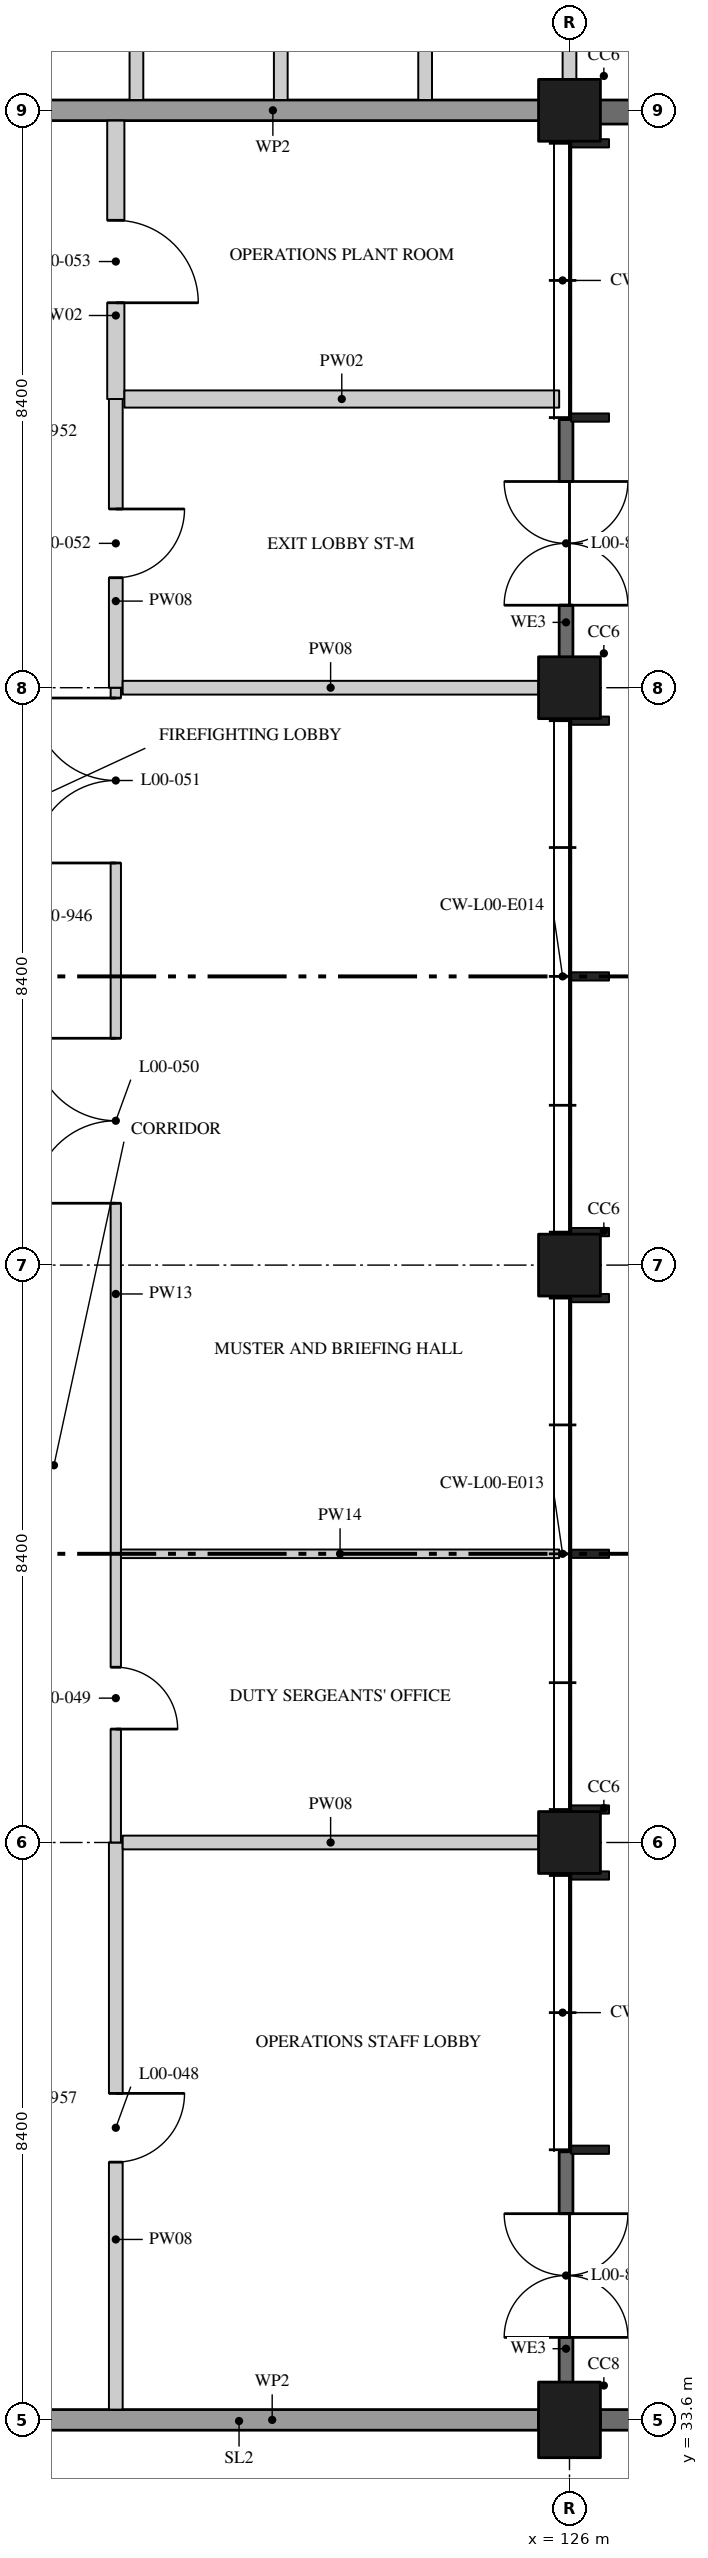
"""IFC4 building model, lengths in metres.
Left out: names, types, materials, properties, quantities, classifications, styles, units other than length and angle.
Written with IfcOpenShell. Run it as: python <this file> out.ifc"""

import sys

from ifc_helpers import new_model, si_unit, direction, frame, frame_2d, origin, origin_2d, place, context, subcontext, project, spatial, rectangle, extrude, element, fill, save


model = new_model("IFC4")
c1 = context("Model", 3, precision=1e-05, world=origin(), true_north=direction((0.0, 1.0)))
c2 = subcontext(c1, "Body", "Model", "MODEL_VIEW")
j1 = project(units=[si_unit("LENGTHUNIT", "METRE"), si_unit("PLANEANGLEUNIT", "RADIAN")], contexts=[c1])
p1 = place(None, origin())
s1 = spatial("IfcSite", under=j1, at=p1, CompositionType="ELEMENT")
p2 = place(p1, origin())
s2 = spatial("IfcBuilding", under=s1, at=p2, CompositionType="ELEMENT")
p3 = place(p2, origin())
s3 = spatial("IfcBuildingStorey", under=s2, at=p3, CompositionType="ELEMENT", Elevation=0.0)
p4 = place(p3, frame((126.0, 33.6, 0.0), z_axis=(0.0, 0.0, 1.0), x_axis=(1.0, 0.0, 0.0)))
e1 = element("IfcColumn", 1, at=p4, inside=s3, PredefinedType="COLUMN", context=c2, shape_type="SweptSolid", body=[
    extrude(rectangle(XDim=0.9, YDim=1.1, at=origin_2d()), origin(), (0.0, 0.0, 1.0), 5.05),
])
for number, where, z_axis, x_axis in (
    (2, (126.0, 42.0, 0.0), (0.0, 0.0, 1.0), (1.0, 0.0, 0.0)),
    (3, (126.0, 50.4, 0.0), (0.0, 0.0, 1.0), (1.0, 0.0, 0.0)),
    (4, (126.0, 58.8, 0.0), (0.0, 0.0, 1.0), (1.0, 0.0, 0.0)),
    (5, (126.0, 67.2, 0.0), (0.0, 0.0, 1.0), (1.0, 0.0, 0.0)),
):
    element("IfcColumn", number, at=place(p3, frame(where, z_axis=z_axis, x_axis=x_axis)), inside=s3, PredefinedType="COLUMN", context=c2, shape_type="SweptSolid", body=[
        extrude(rectangle(XDim=0.9, YDim=0.9, at=origin_2d()), origin(), (0.0, 0.0, 1.0), 5.05),
    ])
p5 = place(p3, frame((119.4, 33.75, 0.0), z_axis=(0.0, 0.0, 1.0), x_axis=(0.0, 1.0, 0.0)))
e6 = element("IfcWall", 6, at=p5, inside=s3, PredefinedType="PARTITIONING", context=c2, shape_type="SweptSolid", body=[
    extrude(rectangle(XDim=8.25, YDim=0.2, at=frame_2d((4.125, 0.0))), origin(), (0.0, 0.0, 1.0), 5.05),
])
p6 = place(p5, frame((3.6, 0.0, 0.0)))
e7 = element("IfcOpeningElement", 7, at=p6, cuts=e6, PredefinedType="OPENING", context=c2, shape_type="SweptSolid", body=[
    extrude(rectangle(XDim=1.0, YDim=2.4, at=frame_2d((0.5, 1.2))), frame((0.0, 0.11, 0.0), z_axis=(0.0, -1.0, 0.0), x_axis=(1.0, 0.0, 0.0)), (0.0, 0.0, 1.0), 0.22),
])
p7 = place(p3, frame((119.4, 42.0, 0.0), z_axis=(0.0, 0.0, 1.0), x_axis=(0.0, 1.0, 0.0)))
e8 = element("IfcWall", 8, at=p7, inside=s3, PredefinedType="PARTITIONING", context=c2, shape_type="SweptSolid", body=[
    extrude(rectangle(XDim=4.2, YDim=0.15, at=frame_2d((2.1, 0.0))), origin(), (0.0, 0.0, 1.0), 5.05),
])
p8 = place(p7, frame((1.65, 0.0, 0.0)))
e9 = element("IfcOpeningElement", 9, at=p8, cuts=e8, PredefinedType="OPENING", context=c2, shape_type="SweptSolid", body=[
    extrude(rectangle(XDim=0.9, YDim=2.1, at=frame_2d((0.45, 1.05))), frame((0.0, 0.085, 0.0), z_axis=(0.0, -1.0, 0.0), x_axis=(1.0, 0.0, 0.0)), (0.0, 0.0, 1.0), 0.17),
])
p9 = place(p3, frame((119.4, 46.2, 0.0), z_axis=(0.0, 0.0, 1.0), x_axis=(0.0, 1.0, 0.0)))
e10 = element("IfcWall", 10, at=p9, inside=s3, PredefinedType="PARTITIONING", context=c2, shape_type="SweptSolid", body=[
    extrude(rectangle(XDim=12.6, YDim=0.15, at=frame_2d((6.3, 0.0))), origin(), (0.0, 0.0, 1.0), 5.05),
])
p10 = place(p9, frame((5.1, 0.0, 0.0)))
e11 = element("IfcOpeningElement", 11, at=p10, cuts=e10, PredefinedType="OPENING", context=c2, shape_type="SweptSolid", body=[
    extrude(rectangle(XDim=2.4, YDim=2.7, at=frame_2d((1.2, 1.35))), frame((0.0, 0.085, 0.0), z_axis=(0.0, -1.0, 0.0), x_axis=(1.0, 0.0, 0.0)), (0.0, 0.0, 1.0), 0.17),
])
p11 = place(p9, frame((10.05, 0.0, 0.0)))
e12 = element("IfcOpeningElement", 12, at=p11, cuts=e10, PredefinedType="OPENING", context=c2, shape_type="SweptSolid", body=[
    extrude(rectangle(XDim=2.4, YDim=2.7, at=frame_2d((1.2, 1.35))), frame((0.0, 0.085, 0.0), z_axis=(0.0, -1.0, 0.0), x_axis=(1.0, 0.0, 0.0)), (0.0, 0.0, 1.0), 0.17),
])
p12 = place(p3, frame((119.4, 58.8, 0.0), z_axis=(0.0, 0.0, 1.0), x_axis=(0.0, 1.0, 0.0)))
e13 = element("IfcWall", 13, at=p12, inside=s3, PredefinedType="PARTITIONING", context=c2, shape_type="SweptSolid", body=[
    extrude(rectangle(XDim=4.2, YDim=0.2, at=frame_2d((2.1, 0.0))), origin(), (0.0, 0.0, 1.0), 5.05),
])
p13 = place(p12, frame((1.6, 0.0, 0.0)))
e14 = element("IfcOpeningElement", 14, at=p13, cuts=e13, PredefinedType="OPENING", context=c2, shape_type="SweptSolid", body=[
    extrude(rectangle(XDim=1.0, YDim=2.4, at=frame_2d((0.5, 1.2))), frame((0.0, 0.11, 0.0), z_axis=(0.0, -1.0, 0.0), x_axis=(1.0, 0.0, 0.0)), (0.0, 0.0, 1.0), 0.22),
])
p14 = place(p3, frame((119.4, 63.0, 0.0), z_axis=(0.0, 0.0, 1.0), x_axis=(0.0, 1.0, 0.0)))
e15 = element("IfcWall", 15, at=p14, inside=s3, PredefinedType="PARTITIONING", context=c2, shape_type="SweptSolid", body=[
    extrude(rectangle(XDim=4.05, YDim=0.25, at=frame_2d((2.025, 0.0))), origin(), (0.0, 0.0, 1.0), 5.05),
])
p15 = place(p14, frame((1.4, 0.0, 0.0)))
e16 = element("IfcOpeningElement", 16, at=p15, cuts=e15, PredefinedType="OPENING", context=c2, shape_type="SweptSolid", body=[
    extrude(rectangle(XDim=1.2, YDim=2.4, at=frame_2d((0.6, 1.2))), frame((0.0, 0.135, 0.0), z_axis=(0.0, -1.0, 0.0), x_axis=(1.0, 0.0, 0.0)), (0.0, 0.0, 1.0), 0.27),
])
p16 = place(p3, frame((119.5, 42.0, 0.0), z_axis=(0.0, 0.0, 1.0), x_axis=(1.0, 0.0, 0.0)))
e17 = element("IfcWall", 17, at=p16, inside=s3, PredefinedType="PARTITIONING", context=c2, shape_type="SweptSolid", body=[
    extrude(rectangle(XDim=6.05, YDim=0.2, at=frame_2d((3.025, 0.0))), origin(), (0.0, 0.0, 1.0), 5.05),
])
p17 = place(p3, frame((119.475, 46.2, 0.0), z_axis=(0.0, 0.0, 1.0), x_axis=(1.0, 0.0, 0.0)))
e18 = element("IfcWall", 18, at=p17, inside=s3, PredefinedType="PARTITIONING", context=c2, shape_type="SweptSolid", body=[
    extrude(rectangle(XDim=6.375, YDim=0.125, at=frame_2d((3.188, 0.0))), origin(), (0.0, 0.0, 1.0), 5.05),
])
p18 = place(p3, frame((119.5, 58.8, 0.0), z_axis=(0.0, 0.0, 1.0), x_axis=(1.0, 0.0, 0.0)))
e19 = element("IfcWall", 19, at=p18, inside=s3, PredefinedType="PARTITIONING", context=c2, shape_type="SweptSolid", body=[
    extrude(rectangle(XDim=6.05, YDim=0.2, at=frame_2d((3.025, 0.0))), origin(), (0.0, 0.0, 1.0), 5.05),
])
p19 = place(p3, frame((119.525, 63.0, 0.0), z_axis=(0.0, 0.0, 1.0), x_axis=(1.0, 0.0, 0.0)))
e20 = element("IfcWall", 20, at=p19, inside=s3, PredefinedType="PARTITIONING", context=c2, shape_type="SweptSolid", body=[
    extrude(rectangle(XDim=6.325, YDim=0.25, at=frame_2d((3.163, 0.0))), origin(), (0.0, 0.0, 1.0), 5.05),
])
for number, where, z_axis, x_axis in (
    (21, (123.9, 67.35, 0.0), (0.0, 0.0, 1.0), (0.0, 1.0, 0.0)),
    (22, (121.8, 67.35, 0.0), (0.0, 0.0, 1.0), (0.0, 1.0, 0.0)),
):
    element("IfcWall", number, at=place(p3, frame(where, z_axis=z_axis, x_axis=x_axis)), inside=s3, PredefinedType="PARTITIONING", context=c2, shape_type="SweptSolid", body=[
        extrude(rectangle(XDim=3.05, YDim=0.2, at=frame_2d((1.525, 0.0))), origin(), (0.0, 0.0, 1.0), 5.05),
    ])
p20 = place(p3, frame((126.0, 67.65, 0.0), z_axis=(0.0, 0.0, 1.0), x_axis=(0.0, 1.0, 0.0)))
e23 = element("IfcWall", 23, at=p20, inside=s3, PredefinedType="PARTITIONING", context=c2, shape_type="SweptSolid", body=[
    extrude(rectangle(XDim=2.75, YDim=0.2, at=frame_2d((1.375, 0.0))), origin(), (0.0, 0.0, 1.0), 5.05),
])
p21 = place(p3, frame((119.7, 67.35, 0.0), z_axis=(0.0, 0.0, 1.0), x_axis=(0.0, 1.0, 0.0)))
e24 = element("IfcWall", 24, at=p21, inside=s3, PredefinedType="PARTITIONING", context=c2, shape_type="SweptSolid", body=[
    extrude(rectangle(XDim=3.05, YDim=0.2, at=frame_2d((1.525, 0.0))), origin(), (0.0, 0.0, 1.0), 5.05),
])
p22 = place(p3, frame((126.45, 33.6, 5.05), z_axis=(0.0, 0.0, 1.0), x_axis=(-1.0, 0.0, 0.0)))
e25 = element("IfcWall", 25, at=p22, inside=s3, PredefinedType="SOLIDWALL", context=c2, shape_type="SweptSolid", body=[
    extrude(rectangle(XDim=0.9, YDim=0.3, at=frame_2d((0.45, 0.0))), origin(), (0.0, 0.0, 1.0), 0.35),
])
p23 = place(p3, frame((134.07, 33.6, 0.0), z_axis=(0.0, 0.0, 1.0), x_axis=(-1.0, 0.0, 0.0)))
e26 = element("IfcWall", 26, at=p23, inside=s3, PredefinedType="SOLIDWALL", context=c2, shape_type="SweptSolid", body=[
    extrude(rectangle(XDim=7.62, YDim=0.3, at=frame_2d((3.81, 0.0))), origin(), (0.0, 0.0, 1.0), 5.4),
])
p24 = place(p23, frame((0.57, 0.0, 0.6)))
e27 = element("IfcOpeningElement", 27, at=p24, cuts=e26, PredefinedType="OPENING", context=c2, shape_type="SweptSolid", body=[
    extrude(rectangle(XDim=2.4, YDim=2.1, at=frame_2d((1.2, 1.05))), frame((0.0, 0.16, 0.0), z_axis=(0.0, -1.0, 0.0), x_axis=(1.0, 0.0, 0.0)), (0.0, 0.0, 1.0), 0.32),
])
p25 = place(p3, frame((125.95, 34.13, 0.0), z_axis=(0.0, 0.0, 1.0), x_axis=(0.0, 1.0, 0.0)))
e28 = element("IfcWall", 28, at=p25, inside=s3, PredefinedType="SOLIDWALL", context=c2, shape_type="SweptSolid", body=[
    extrude(rectangle(XDim=3.37, YDim=0.2, at=frame_2d((1.685, 0.0))), origin(), (0.0, 0.0, 1.0), 5.05),
])
p26 = place(p25, frame((0.67, 0.0, 0.0)))
e29 = element("IfcOpeningElement", 29, at=p26, cuts=e28, PredefinedType="OPENING", context=c2, shape_type="SweptSolid", body=[
    extrude(rectangle(XDim=1.8, YDim=2.4, at=frame_2d((0.9, 1.2))), frame((0.0, 0.11, 0.0), z_axis=(0.0, -1.0, 0.0), x_axis=(1.0, 0.0, 0.0)), (0.0, 0.0, 1.0), 0.22),
])
p27 = place(p3, frame((125.95, 59.23, 0.0), z_axis=(0.0, 0.0, 1.0), x_axis=(0.0, 1.0, 0.0)))
e30 = element("IfcWall", 30, at=p27, inside=s3, PredefinedType="SOLIDWALL", context=c2, shape_type="SweptSolid", body=[
    extrude(rectangle(XDim=3.47, YDim=0.2, at=frame_2d((1.735, 0.0))), origin(), (0.0, 0.0, 1.0), 5.05),
])
p28 = place(p27, frame((0.77, 0.0, 0.0)))
e31 = element("IfcOpeningElement", 31, at=p28, cuts=e30, PredefinedType="OPENING", context=c2, shape_type="SweptSolid", body=[
    extrude(rectangle(XDim=1.8, YDim=2.4, at=frame_2d((0.9, 1.2))), frame((0.0, 0.11, 0.0), z_axis=(0.0, -1.0, 0.0), x_axis=(1.0, 0.0, 0.0)), (0.0, 0.0, 1.0), 0.22),
])
p29 = place(p3, frame((126.43, 67.175, 0.0), z_axis=(0.0, 0.0, 1.0), x_axis=(1.0, 0.0, 0.0)))
e32 = element("IfcWall", 32, at=p29, inside=s3, PredefinedType="SOLIDWALL", context=c2, shape_type="SweptSolid", body=[
    extrude(rectangle(XDim=7.59, YDim=0.35, at=frame_2d((3.795, 0.0))), origin(), (0.0, 0.0, 1.0), 5.05),
])
p30 = place(p3, frame((125.55, 33.6, 0.0), z_axis=(0.0, 0.0, 1.0), x_axis=(-1.0, 0.0, 0.0)))
e33 = element("IfcWall", 33, at=p30, inside=s3, PredefinedType="SOLIDWALL", context=c2, shape_type="SweptSolid", body=[
    extrude(rectangle(XDim=7.75, YDim=0.3, at=frame_2d((3.875, 0.0))), origin(), (0.0, 0.0, 1.0), 5.4),
])
p31 = place(p3, frame((125.57, 67.2, 0.0), z_axis=(0.0, 0.0, 1.0), x_axis=(-1.0, 0.0, 0.0)))
e34 = element("IfcWall", 34, at=p31, inside=s3, PredefinedType="SOLIDWALL", context=c2, shape_type="SweptSolid", body=[
    extrude(rectangle(XDim=7.77, YDim=0.3, at=frame_2d((3.885, 0.0))), origin(), (0.0, 0.0, 1.0), 5.05),
])
p32 = place(p6, frame((1.0, 0.0, 0.0), z_axis=(0.0, 0.0, 1.0), x_axis=(-1.0, 0.0, 0.0)))
e35 = element("IfcDoor", 35, at=p32, inside=s3, OperationType="SINGLE_SWING_RIGHT", PredefinedType="DOOR", context=c2, shape_type="SweptSolid", body=[
    extrude(rectangle(XDim=1.0, YDim=2.4, at=frame_2d((0.5, 1.2))), frame((0.0, 0.03, 0.0), z_axis=(0.0, -1.0, 0.0), x_axis=(1.0, 0.0, 0.0)), (0.0, 0.0, 1.0), 0.06),
])
fill(e7, e35)
p33 = place(p8, frame((0.9, 0.0, 0.0), z_axis=(0.0, 0.0, 1.0), x_axis=(-1.0, 0.0, 0.0)))
e36 = element("IfcDoor", 36, at=p33, inside=s3, OperationType="SINGLE_SWING_LEFT", PredefinedType="DOOR", context=c2, shape_type="SweptSolid", body=[
    extrude(rectangle(XDim=0.9, YDim=2.1, at=frame_2d((0.45, 1.05))), frame((0.0, 0.025, 0.0), z_axis=(0.0, -1.0, 0.0), x_axis=(1.0, 0.0, 0.0)), (0.0, 0.0, 1.0), 0.05),
])
fill(e9, e36)
p34 = place(p10, origin())
e37 = element("IfcDoor", 37, at=p34, inside=s3, OperationType="DOUBLE_DOOR_SINGLE_SWING", PredefinedType="DOOR", context=c2, shape_type="SweptSolid", body=[
    extrude(rectangle(XDim=2.4, YDim=2.7, at=frame_2d((1.2, 1.35))), frame((0.0, 0.025, 0.0), z_axis=(0.0, -1.0, 0.0), x_axis=(1.0, 0.0, 0.0)), (0.0, 0.0, 1.0), 0.05),
])
fill(e11, e37)
p35 = place(p11, origin())
e38 = element("IfcDoor", 38, at=p35, inside=s3, OperationType="DOUBLE_DOOR_SINGLE_SWING", PredefinedType="DOOR", context=c2, shape_type="SweptSolid", body=[
    extrude(rectangle(XDim=2.4, YDim=2.7, at=frame_2d((1.2, 1.35))), frame((0.0, 0.025, 0.0), z_axis=(0.0, -1.0, 0.0), x_axis=(1.0, 0.0, 0.0)), (0.0, 0.0, 1.0), 0.05),
])
fill(e12, e38)
p36 = place(p13, frame((1.0, 0.0, 0.0), z_axis=(0.0, 0.0, 1.0), x_axis=(-1.0, 0.0, 0.0)))
e39 = element("IfcDoor", 39, at=p36, inside=s3, OperationType="SINGLE_SWING_RIGHT", PredefinedType="DOOR", context=c2, shape_type="SweptSolid", body=[
    extrude(rectangle(XDim=1.0, YDim=2.4, at=frame_2d((0.5, 1.2))), frame((0.0, 0.03, 0.0), z_axis=(0.0, -1.0, 0.0), x_axis=(1.0, 0.0, 0.0)), (0.0, 0.0, 1.0), 0.06),
])
fill(e14, e39)
p37 = place(p15, frame((1.2, 0.0, 0.0), z_axis=(0.0, 0.0, 1.0), x_axis=(-1.0, 0.0, 0.0)))
e40 = element("IfcDoor", 40, at=p37, inside=s3, OperationType="SINGLE_SWING_LEFT", PredefinedType="DOOR", context=c2, shape_type="SweptSolid", body=[
    extrude(rectangle(XDim=1.2, YDim=2.4, at=frame_2d((0.6, 1.2))), frame((0.0, 0.05, 0.0), z_axis=(0.0, -1.0, 0.0), x_axis=(1.0, 0.0, 0.0)), (0.0, 0.0, 1.0), 0.1),
])
fill(e16, e40)
p38 = place(p26, frame((1.8, 0.0, 0.0), z_axis=(0.0, 0.0, 1.0), x_axis=(-1.0, 0.0, 0.0)))
e41 = element("IfcDoor", 41, at=p38, inside=s3, OperationType="DOUBLE_DOOR_DOUBLE_SWING", PredefinedType="DOOR", context=c2, shape_type="SweptSolid", body=[
    extrude(rectangle(XDim=1.8, YDim=2.4, at=frame_2d((0.9, 1.2))), frame((0.0, 0.025, 0.0), z_axis=(0.0, -1.0, 0.0), x_axis=(1.0, 0.0, 0.0)), (0.0, 0.0, 1.0), 0.05),
])
fill(e29, e41)
p39 = place(p28, frame((1.8, 0.0, 0.0), z_axis=(0.0, 0.0, 1.0), x_axis=(-1.0, 0.0, 0.0)))
e42 = element("IfcDoor", 42, at=p39, inside=s3, OperationType="DOUBLE_DOOR_DOUBLE_SWING", PredefinedType="DOOR", context=c2, shape_type="SweptSolid", body=[
    extrude(rectangle(XDim=1.8, YDim=2.4, at=frame_2d((0.9, 1.2))), frame((0.0, 0.025, 0.0), z_axis=(0.0, -1.0, 0.0), x_axis=(1.0, 0.0, 0.0)), (0.0, 0.0, 1.0), 0.05),
])
fill(e31, e42)
save(model, sys.argv[1])
